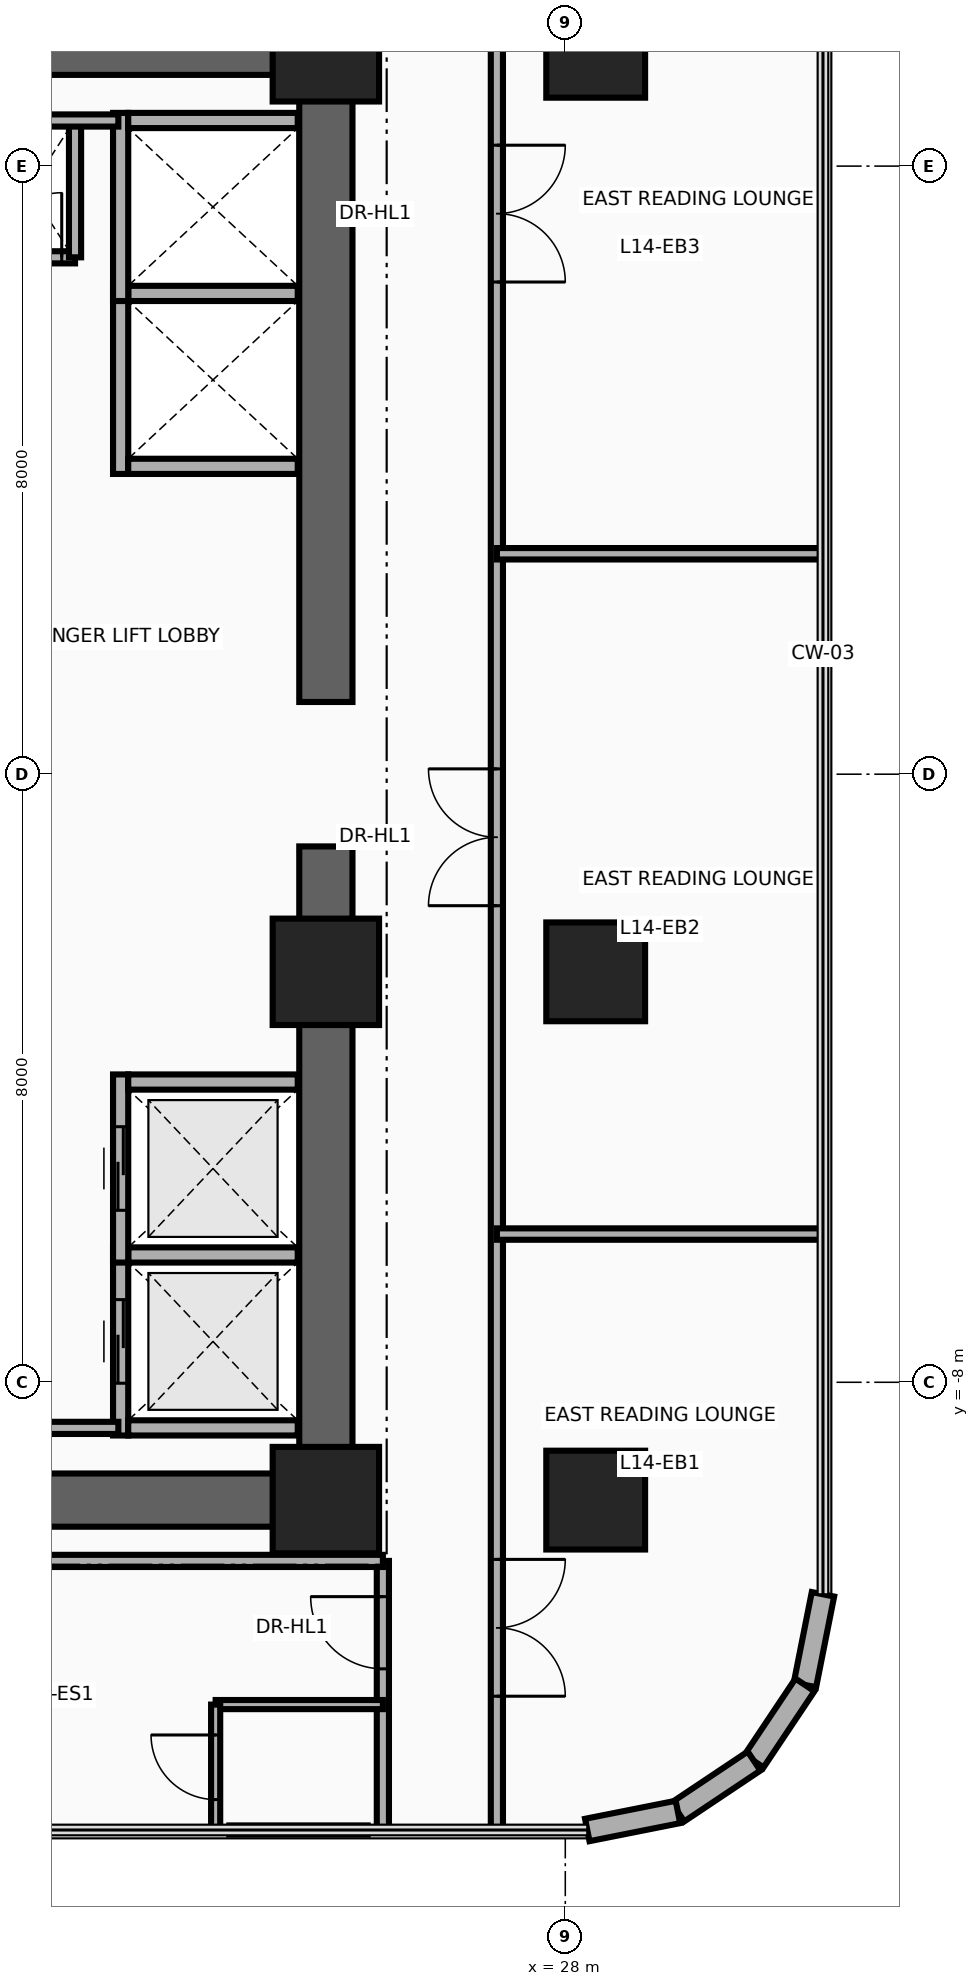
"""IFC4 building model, lengths in metres.
Left out: names, types, materials, properties, quantities, classifications, styles, units other than length and angle.
Written with IfcOpenShell. Run it as: python <this file> out.ifc"""

import sys

from ifc_helpers import new_model, si_unit, direction, frame, frame_2d, origin, origin_2d, place, context, subcontext, project, spatial, rectangle, circle, extrude, source, transform, mapped, element, fill, save


model = new_model("IFC4")
c1 = context("Model", 3, precision=1e-05, world=origin(), true_north=direction((0.0, 1.0)))
c2 = subcontext(c1, "Body", "Model", "MODEL_VIEW")
j1 = project(units=[si_unit("LENGTHUNIT", "METRE"), si_unit("PLANEANGLEUNIT", "RADIAN")], contexts=[c1])
p1 = place(None, origin())
s1 = spatial("IfcSite", under=j1, at=p1, CompositionType="ELEMENT")
p2 = place(p1, origin())
s2 = spatial("IfcBuilding", under=s1, at=p2, CompositionType="ELEMENT")
p3 = place(p2, frame((0.0, 0.0, 59.3)))
s3 = spatial("IfcBuildingStorey", under=s2, at=p3, CompositionType="ELEMENT", Elevation=59.3)
for number, where, z_axis, x_axis in (
    (1, (24.85, -9.9, 0.0), (0.0, 0.0, 1.0), (0.0, 1.0, 0.0)),
    (2, (24.85, 0.95, 0.0), (0.0, 0.0, 1.0), (0.0, 1.0, 0.0)),
):
    element("IfcWall", number, at=place(p3, frame(where, z_axis=z_axis, x_axis=x_axis)), inside=s3, PredefinedType="SHEAR", context=c2, shape_type="SweptSolid", body=[
        extrude(rectangle(XDim=8.95, YDim=0.7, at=frame_2d((4.475, 0.0))), origin(), (0.0, 0.0, 1.0), 3.46),
    ])
for number, where, z_axis, x_axis in (
    (3, (15.85, 9.55, 0.0), (0.0, 0.0, 1.0), (1.0, 0.0, 0.0)),
    (4, (15.85, -9.55, 0.0), (0.0, 0.0, 1.0), (1.0, 0.0, 0.0)),
):
    element("IfcWall", number, at=place(p3, frame(where, z_axis=z_axis, x_axis=x_axis)), inside=s3, PredefinedType="SHEAR", context=c2, shape_type="SweptSolid", body=[
        extrude(rectangle(XDim=9.0, YDim=0.7, at=frame_2d((4.5, 0.0))), origin(), (0.0, 0.0, 1.0), 3.46),
    ])
m1 = source(origin(), c2, "Body", "SweptSolid", [
    extrude(rectangle(XDim=1.4, YDim=1.4, at=origin_2d()), origin(), (0.0, 0.0, 1.0), 3.7),
])
p4 = place(p3, frame((24.85, -9.55, 0.0), z_axis=(0.0, 0.0, 1.0), x_axis=(1.0, 0.0, 0.0)))
e5 = element("IfcColumn", 5, at=p4, inside=s3, PredefinedType="COLUMN", context=c2, shape_type="MappedRepresentation", body=[
    mapped(m1, transform((0.0, 0.0, 0.0), x_axis=(1.0, 0.0, 0.0), y_axis=(0.0, 1.0, 0.0), z_axis=(0.0, 0.0, 1.0), scale=1.0)),
])
m2 = source(origin(), c2, "Body", "SweptSolid", [
    extrude(circle(Radius=0.65, at=origin_2d()), origin(), (0.0, 0.0, 1.0), 3.7),
])
p5 = place(p3, frame((28.4, -9.55, 0.0), z_axis=(0.0, 0.0, 1.0), x_axis=(1.0, 0.0, 0.0)))
e6 = element("IfcColumn", 6, at=p5, inside=s3, PredefinedType="COLUMN", context=c2, shape_type="MappedRepresentation", body=[
    mapped(m2, transform((0.0, 0.0, 0.0), x_axis=(1.0, 0.0, 0.0), y_axis=(0.0, 1.0, 0.0), z_axis=(0.0, 0.0, 1.0), scale=1.0)),
])
p6 = place(p3, frame((24.85, -2.6, 0.0), z_axis=(0.0, 0.0, 1.0), x_axis=(1.0, 0.0, 0.0)))
e7 = element("IfcColumn", 7, at=p6, inside=s3, PredefinedType="COLUMN", context=c2, shape_type="MappedRepresentation", body=[
    mapped(m1, transform((0.0, 0.0, 0.0), x_axis=(1.0, 0.0, 0.0), y_axis=(0.0, 1.0, 0.0), z_axis=(0.0, 0.0, 1.0), scale=1.0)),
])
p7 = place(p3, frame((28.4, -2.6, 0.0), z_axis=(0.0, 0.0, 1.0), x_axis=(1.0, 0.0, 0.0)))
e8 = element("IfcColumn", 8, at=p7, inside=s3, PredefinedType="COLUMN", context=c2, shape_type="MappedRepresentation", body=[
    mapped(m2, transform((0.0, 0.0, 0.0), x_axis=(1.0, 0.0, 0.0), y_axis=(0.0, 1.0, 0.0), z_axis=(0.0, 0.0, 1.0), scale=1.0)),
])
p8 = place(p3, frame((24.85, 9.55, 0.0), z_axis=(0.0, 0.0, 1.0), x_axis=(1.0, 0.0, 0.0)))
e9 = element("IfcColumn", 9, at=p8, inside=s3, PredefinedType="COLUMN", context=c2, shape_type="MappedRepresentation", body=[
    mapped(m1, transform((0.0, 0.0, 0.0), x_axis=(1.0, 0.0, 0.0), y_axis=(0.0, 1.0, 0.0), z_axis=(0.0, 0.0, 1.0), scale=1.0)),
])
p9 = place(p3, frame((28.4, 9.55, 0.0), z_axis=(0.0, 0.0, 1.0), x_axis=(1.0, 0.0, 0.0)))
e10 = element("IfcColumn", 10, at=p9, inside=s3, PredefinedType="COLUMN", context=c2, shape_type="MappedRepresentation", body=[
    mapped(m2, transform((0.0, 0.0, 0.0), x_axis=(1.0, 0.0, 0.0), y_axis=(0.0, 1.0, 0.0), z_axis=(0.0, 0.0, 1.0), scale=1.0)),
])
p10 = place(p3, frame((31.39, -10.789, 0.0), z_axis=(0.0, 0.0, 1.0), x_axis=(-0.194996050505, -0.980804027463, 0.0)))
e11 = element("IfcWall", 11, at=p10, inside=s3, PredefinedType="SOLIDWALL", context=c2, shape_type="SweptSolid", body=[
    extrude(rectangle(XDim=1.216, YDim=0.3, at=frame_2d((0.608, 0.0))), origin(), (0.0, 0.0, 1.0), 3.46),
])
for number, where, z_axis, x_axis in (
    (12, (31.153, -11.982, 0.0), (0.0, 0.0, 1.0), (-0.556, -0.831, 0.0)),
    (13, (30.483, -12.983, 0.0), (0.0, 0.0, 1.0), (-0.831, -0.556, 0.0)),
):
    element("IfcWall", number, at=place(p3, frame(where, z_axis=z_axis, x_axis=x_axis)), inside=s3, PredefinedType="SOLIDWALL", context=c2, shape_type="SweptSolid", body=[
        extrude(rectangle(XDim=1.205, YDim=0.3, at=frame_2d((0.603, 0.0))), origin(), (0.0, 0.0, 1.0), 3.46),
    ])
p11 = place(p3, frame((29.482, -13.653, 0.0), z_axis=(0.0, 0.0, 1.0), x_axis=(-0.980804027463, -0.194996050505, 0.0)))
e14 = element("IfcWall", 14, at=p11, inside=s3, PredefinedType="SOLIDWALL", context=c2, shape_type="SweptSolid", body=[
    extrude(rectangle(XDim=1.216, YDim=0.3, at=frame_2d((0.608, 0.0))), origin(), (0.0, 0.0, 1.0), 3.46),
])
p12 = place(p3, frame((22.15, -8.7, 0.0), z_axis=(0.0, 0.0, 1.0), x_axis=(0.0, 1.0, 0.0)))
e15 = element("IfcWall", 15, at=p12, inside=s3, PredefinedType="MOVABLE", context=c2, shape_type="SweptSolid", body=[
    extrude(rectangle(XDim=2.475, YDim=0.2, at=frame_2d((1.237, 0.0))), origin(), (0.0, 0.0, 1.0), 3.46),
])
p13 = place(p12, frame((0.688, 0.0, 0.0)))
e16 = element("IfcOpeningElement", 16, at=p13, cuts=e15, PredefinedType="OPENING", context=c2, shape_type="SweptSolid", body=[
    extrude(rectangle(XDim=1.1, YDim=2.1, at=frame_2d((0.55, 1.05))), frame((0.0, 0.115, 0.0), z_axis=(0.0, -1.0, 0.0), x_axis=(1.0, 0.0, 0.0)), (0.0, 0.0, 1.0), 0.23),
])
for number, where, z_axis, x_axis in (
    (17, (22.25, -8.6, 0.0), (0.0, 0.0, 1.0), (1.0, 0.0, 0.0)),
    (18, (22.25, -6.325, 0.0), (0.0, 0.0, 1.0), (1.0, 0.0, 0.0)),
):
    element("IfcWall", number, at=place(p3, frame(where, z_axis=z_axis, x_axis=x_axis)), inside=s3, PredefinedType="MOVABLE", context=c2, shape_type="SweptSolid", body=[
        extrude(rectangle(XDim=2.23, YDim=0.2, at=frame_2d((1.115, 0.0))), origin(), (0.0, 0.0, 1.0), 3.46),
    ])
p14 = place(p3, frame((22.15, -6.425, 0.0), z_axis=(0.0, 0.0, 1.0), x_axis=(0.0, 1.0, 0.0)))
e19 = element("IfcWall", 19, at=p14, inside=s3, PredefinedType="MOVABLE", context=c2, shape_type="SweptSolid", body=[
    extrude(rectangle(XDim=2.475, YDim=0.2, at=frame_2d((1.238, 0.0))), origin(), (0.0, 0.0, 1.0), 3.46),
])
p15 = place(p14, frame((0.688, 0.0, 0.0)))
e20 = element("IfcOpeningElement", 20, at=p15, cuts=e19, PredefinedType="OPENING", context=c2, shape_type="SweptSolid", body=[
    extrude(rectangle(XDim=1.1, YDim=2.1, at=frame_2d((0.55, 1.05))), frame((0.0, 0.115, 0.0), z_axis=(0.0, -1.0, 0.0), x_axis=(1.0, 0.0, 0.0)), (0.0, 0.0, 1.0), 0.23),
])
p16 = place(p3, frame((22.25, -4.05, 0.0), z_axis=(0.0, 0.0, 1.0), x_axis=(1.0, 0.0, 0.0)))
e21 = element("IfcWall", 21, at=p16, inside=s3, PredefinedType="MOVABLE", context=c2, shape_type="SweptSolid", body=[
    extrude(rectangle(XDim=2.23, YDim=0.2, at=frame_2d((1.115, 0.0))), origin(), (0.0, 0.0, 1.0), 3.46),
])
p17 = place(p3, frame((22.15, 3.95, 0.0), z_axis=(0.0, 0.0, 1.0), x_axis=(0.0, 1.0, 0.0)))
e22 = element("IfcWall", 22, at=p17, inside=s3, PredefinedType="MOVABLE", context=c2, shape_type="SweptSolid", body=[
    extrude(rectangle(XDim=2.475, YDim=0.2, at=frame_2d((1.238, 0.0))), origin(), (0.0, 0.0, 1.0), 3.46),
])
for number, where, z_axis, x_axis in (
    (23, (22.25, 4.05, 0.0), (0.0, 0.0, 1.0), (1.0, 0.0, 0.0)),
    (24, (22.25, 6.325, 0.0), (0.0, 0.0, 1.0), (1.0, 0.0, 0.0)),
):
    element("IfcWall", number, at=place(p3, frame(where, z_axis=z_axis, x_axis=x_axis)), inside=s3, PredefinedType="MOVABLE", context=c2, shape_type="SweptSolid", body=[
        extrude(rectangle(XDim=2.23, YDim=0.2, at=frame_2d((1.115, 0.0))), origin(), (0.0, 0.0, 1.0), 2.245),
    ])
p18 = place(p3, frame((22.15, 6.225, 0.0), z_axis=(0.0, 0.0, 1.0), x_axis=(0.0, 1.0, 0.0)))
e25 = element("IfcWall", 25, at=p18, inside=s3, PredefinedType="MOVABLE", context=c2, shape_type="SweptSolid", body=[
    extrude(rectangle(XDim=2.475, YDim=0.2, at=frame_2d((1.237, 0.0))), origin(), (0.0, 0.0, 1.0), 3.46),
])
p19 = place(p3, frame((22.25, 8.6, 0.0), z_axis=(0.0, 0.0, 1.0), x_axis=(1.0, 0.0, 0.0)))
e26 = element("IfcWall", 26, at=p19, inside=s3, PredefinedType="MOVABLE", context=c2, shape_type="SweptSolid", body=[
    extrude(rectangle(XDim=2.23, YDim=0.2, at=frame_2d((1.115, 0.0))), origin(), (0.0, 0.0, 1.0), 2.245),
])
p20 = place(p3, frame((20.35, 6.8, 0.0), z_axis=(0.0, 0.0, 1.0), x_axis=(1.0, 0.0, 0.0)))
e27 = element("IfcWall", 27, at=p20, inside=s3, PredefinedType="PARTITIONING", context=c2, shape_type="SweptSolid", body=[
    extrude(rectangle(XDim=1.2, YDim=0.16, at=frame_2d((0.6, 0.0))), origin(), (0.0, 0.0, 1.0), 3.46),
])
p21 = place(p20, frame((0.175, 0.0, 0.0)))
e28 = element("IfcOpeningElement", 28, at=p21, cuts=e27, PredefinedType="OPENING", context=c2, shape_type="SweptSolid", body=[
    extrude(rectangle(XDim=0.85, YDim=2.05, at=frame_2d((0.425, 1.025))), frame((0.0, 0.095, 0.0), z_axis=(0.0, -1.0, 0.0), x_axis=(1.0, 0.0, 0.0)), (0.0, 0.0, 1.0), 0.19),
])
p22 = place(p3, frame((21.55, 6.8, 0.0), z_axis=(0.0, 0.0, 1.0), x_axis=(0.0, 1.0, 0.0)))
e29 = element("IfcWall", 29, at=p22, inside=s3, PredefinedType="PARTITIONING", context=c2, shape_type="SweptSolid", body=[
    extrude(rectangle(XDim=1.8, YDim=0.16, at=frame_2d((0.9, 0.0))), origin(), (0.0, 0.0, 1.0), 3.46),
])
for number, where, z_axis, x_axis in (
    (30, (20.3, -8.6, 0.0), (0.0, 0.0, 1.0), (1.0, 0.0, 0.0)),
    (31, (20.3, 8.6, 0.0), (0.0, 0.0, 1.0), (1.0, 0.0, 0.0)),
):
    element("IfcWall", number, at=place(p3, frame(where, z_axis=z_axis, x_axis=x_axis)), inside=s3, PredefinedType="PARTITIONING", context=c2, shape_type="SweptSolid", body=[
        extrude(rectangle(XDim=1.82, YDim=0.16, at=frame_2d((0.91, 0.0))), origin(), (0.0, 0.0, 1.0), 3.46),
    ])
p23 = place(p3, frame((25.6, -13.89, 0.0), z_axis=(0.0, 0.0, 1.0), x_axis=(0.0, 1.0, 0.0)))
e32 = element("IfcWall", 32, at=p23, inside=s3, PredefinedType="PARTITIONING", context=c2, shape_type="SweptSolid", body=[
    extrude(rectangle(XDim=3.54, YDim=0.16, at=frame_2d((1.77, 0.0))), origin(), (0.0, 0.0, 1.0), 3.46),
])
p24 = place(p23, frame((2.12, 0.0, 0.0)))
e33 = element("IfcOpeningElement", 33, at=p24, cuts=e32, PredefinedType="OPENING", context=c2, shape_type="SweptSolid", body=[
    extrude(rectangle(XDim=0.95, YDim=2.15, at=frame_2d((0.475, 1.075))), frame((0.0, 0.095, 0.0), z_axis=(0.0, -1.0, 0.0), x_axis=(1.0, 0.0, 0.0)), (0.0, 0.0, 1.0), 0.19),
])
p25 = place(p3, frame((13.41, -10.35, 0.0), z_axis=(0.0, 0.0, 1.0), x_axis=(1.0, 0.0, 0.0)))
e34 = element("IfcWall", 34, at=p25, inside=s3, PredefinedType="PARTITIONING", context=c2, shape_type="SweptSolid", body=[
    extrude(rectangle(XDim=12.19, YDim=0.16, at=frame_2d((6.095, 0.0))), origin(), (0.0, 0.0, 1.0), 3.46),
])
p26 = place(p3, frame((23.4, -12.24, 0.0), z_axis=(0.0, 0.0, 1.0), x_axis=(1.0, 0.0, 0.0)))
e35 = element("IfcWall", 35, at=p26, inside=s3, PredefinedType="PARTITIONING", context=c2, shape_type="SweptSolid", body=[
    extrude(rectangle(XDim=2.2, YDim=0.12, at=frame_2d((1.1, 0.0))), origin(), (0.0, 0.0, 1.0), 3.46),
])
p27 = place(p3, frame((23.4, -13.89, 0.0), z_axis=(0.0, 0.0, 1.0), x_axis=(0.0, 1.0, 0.0)))
e36 = element("IfcWall", 36, at=p27, inside=s3, PredefinedType="PARTITIONING", context=c2, shape_type="SweptSolid", body=[
    extrude(rectangle(XDim=1.65, YDim=0.12, at=frame_2d((0.825, 0.0))), origin(), (0.0, 0.0, 1.0), 3.46),
])
p28 = place(p27, frame((0.4, 0.0, 0.0)))
e37 = element("IfcOpeningElement", 37, at=p28, cuts=e36, PredefinedType="OPENING", context=c2, shape_type="SweptSolid", body=[
    extrude(rectangle(XDim=0.85, YDim=2.1, at=frame_2d((0.425, 1.05))), frame((0.0, 0.075, 0.0), z_axis=(0.0, -1.0, 0.0), x_axis=(1.0, 0.0, 0.0)), (0.0, 0.0, 1.0), 0.15),
])
p29 = place(p3, frame((23.58, -13.89, 0.0), z_axis=(0.0, 0.0, 1.0), x_axis=(1.0, 0.0, 0.0)))
e38 = element("IfcWall", 38, at=p29, inside=s3, PredefinedType="PARTITIONING", context=c2, shape_type="SweptSolid", body=[
    extrude(rectangle(XDim=1.82, YDim=0.12, at=frame_2d((0.91, 0.0))), origin(), (0.0, 0.0, 1.0), 3.46),
])
p30 = place(p3, frame((27.1, -13.89, 0.0), z_axis=(0.0, 0.0, 1.0), x_axis=(0.0, 1.0, 0.0)))
e39 = element("IfcWall", 39, at=p30, inside=s3, PredefinedType="PARTITIONING", context=c2, shape_type="SweptSolid", body=[
    extrude(rectangle(XDim=25.74, YDim=0.16, at=frame_2d((12.87, 0.0))), origin(), (0.0, 0.0, 1.0), 2.583),
])
p31 = place(p30, frame((1.76, 0.0, 0.0)))
e40 = element("IfcOpeningElement", 40, at=p31, cuts=e39, PredefinedType="OPENING", context=c2, shape_type="SweptSolid", body=[
    extrude(rectangle(XDim=1.8, YDim=2.15, at=frame_2d((0.9, 1.075))), frame((0.0, 0.095, 0.0), z_axis=(0.0, -1.0, 0.0), x_axis=(1.0, 0.0, 0.0)), (0.0, 0.0, 1.0), 0.19),
])
p32 = place(p30, frame((12.16, 0.0, 0.0)))
e41 = element("IfcOpeningElement", 41, at=p32, cuts=e39, PredefinedType="OPENING", context=c2, shape_type="SweptSolid", body=[
    extrude(rectangle(XDim=1.8, YDim=2.15, at=frame_2d((0.9, 1.075))), frame((0.0, 0.095, 0.0), z_axis=(0.0, -1.0, 0.0), x_axis=(1.0, 0.0, 0.0)), (0.0, 0.0, 1.0), 0.19),
])
p33 = place(p30, frame((20.365, 0.0, 0.0)))
e42 = element("IfcOpeningElement", 42, at=p33, cuts=e39, PredefinedType="OPENING", context=c2, shape_type="SweptSolid", body=[
    extrude(rectangle(XDim=1.8, YDim=2.15, at=frame_2d((0.9, 1.075))), frame((0.0, 0.095, 0.0), z_axis=(0.0, -1.0, 0.0), x_axis=(1.0, 0.0, 0.0)), (0.0, 0.0, 1.0), 0.19),
])
for number, where, z_axis, x_axis in (
    (43, (27.1, -6.05, 0.0), (0.0, 0.0, 1.0), (1.0, 0.0, 0.0)),
    (44, (27.1, 2.9, 0.0), (0.0, 0.0, 1.0), (1.0, 0.0, 0.0)),
):
    element("IfcWall", number, at=place(p3, frame(where, z_axis=z_axis, x_axis=x_axis)), inside=s3, PredefinedType="PARTITIONING", context=c2, shape_type="SweptSolid", body=[
        extrude(rectangle(XDim=4.29, YDim=0.15, at=frame_2d((2.145, 0.0))), origin(), (0.0, 0.0, 1.0), 2.896),
    ])
p34 = place(p13, origin())
e45 = element("IfcDoor", 45, at=p34, inside=s3, OperationType="DOUBLE_DOOR_SLIDING", PredefinedType="DOOR", context=c2, shape_type="SweptSolid", body=[
    extrude(rectangle(XDim=1.1, YDim=2.1, at=frame_2d((0.55, 1.05))), frame((0.0, 0.025, 0.0), z_axis=(0.0, -1.0, 0.0), x_axis=(1.0, 0.0, 0.0)), (0.0, 0.0, 1.0), 0.05),
])
fill(e16, e45)
p35 = place(p15, origin())
e46 = element("IfcDoor", 46, at=p35, inside=s3, OperationType="DOUBLE_DOOR_SLIDING", PredefinedType="DOOR", context=c2, shape_type="SweptSolid", body=[
    extrude(rectangle(XDim=1.1, YDim=2.1, at=frame_2d((0.55, 1.05))), frame((0.0, 0.025, 0.0), z_axis=(0.0, -1.0, 0.0), x_axis=(1.0, 0.0, 0.0)), (0.0, 0.0, 1.0), 0.05),
])
fill(e20, e46)
p36 = place(p21, origin())
e47 = element("IfcDoor", 47, at=p36, inside=s3, OperationType="SINGLE_SWING_LEFT", PredefinedType="DOOR", context=c2, shape_type="SweptSolid", body=[
    extrude(rectangle(XDim=0.85, YDim=2.05, at=frame_2d((0.425, 1.025))), frame((0.0, 0.025, 0.0), z_axis=(0.0, -1.0, 0.0), x_axis=(1.0, 0.0, 0.0)), (0.0, 0.0, 1.0), 0.05),
])
fill(e28, e47)
p37 = place(p24, origin())
e48 = element("IfcDoor", 48, at=p37, inside=s3, OperationType="SINGLE_SWING_RIGHT", PredefinedType="DOOR", context=c2, shape_type="SweptSolid", body=[
    extrude(rectangle(XDim=0.95, YDim=2.15, at=frame_2d((0.475, 1.075))), frame((0.0, 0.025, 0.0), z_axis=(0.0, -1.0, 0.0), x_axis=(1.0, 0.0, 0.0)), (0.0, 0.0, 1.0), 0.05),
])
fill(e33, e48)
p38 = place(p28, origin())
e49 = element("IfcDoor", 49, at=p38, inside=s3, OperationType="SINGLE_SWING_LEFT", PredefinedType="DOOR", context=c2, shape_type="SweptSolid", body=[
    extrude(rectangle(XDim=0.85, YDim=2.1, at=frame_2d((0.425, 1.05))), frame((0.0, 0.025, 0.0), z_axis=(0.0, -1.0, 0.0), x_axis=(1.0, 0.0, 0.0)), (0.0, 0.0, 1.0), 0.05),
])
fill(e37, e49)
p39 = place(p31, frame((1.8, 0.0, 0.0), z_axis=(0.0, 0.0, 1.0), x_axis=(-1.0, 0.0, 0.0)))
e50 = element("IfcDoor", 50, at=p39, inside=s3, OperationType="DOUBLE_DOOR_SINGLE_SWING", PredefinedType="DOOR", context=c2, shape_type="SweptSolid", body=[
    extrude(rectangle(XDim=1.8, YDim=2.15, at=frame_2d((0.9, 1.075))), frame((0.0, 0.025, 0.0), z_axis=(0.0, -1.0, 0.0), x_axis=(1.0, 0.0, 0.0)), (0.0, 0.0, 1.0), 0.05),
])
fill(e40, e50)
p40 = place(p32, origin())
e51 = element("IfcDoor", 51, at=p40, inside=s3, OperationType="DOUBLE_DOOR_SINGLE_SWING", PredefinedType="DOOR", context=c2, shape_type="SweptSolid", body=[
    extrude(rectangle(XDim=1.8, YDim=2.15, at=frame_2d((0.9, 1.075))), frame((0.0, 0.025, 0.0), z_axis=(0.0, -1.0, 0.0), x_axis=(1.0, 0.0, 0.0)), (0.0, 0.0, 1.0), 0.05),
])
fill(e41, e51)
p41 = place(p33, frame((1.8, 0.0, 0.0), z_axis=(0.0, 0.0, 1.0), x_axis=(-1.0, 0.0, 0.0)))
e52 = element("IfcDoor", 52, at=p41, inside=s3, OperationType="DOUBLE_DOOR_SINGLE_SWING", PredefinedType="DOOR", context=c2, shape_type="SweptSolid", body=[
    extrude(rectangle(XDim=1.8, YDim=2.15, at=frame_2d((0.9, 1.075))), frame((0.0, 0.025, 0.0), z_axis=(0.0, -1.0, 0.0), x_axis=(1.0, 0.0, 0.0)), (0.0, 0.0, 1.0), 0.05),
])
fill(e42, e52)
save(model, sys.argv[1])
